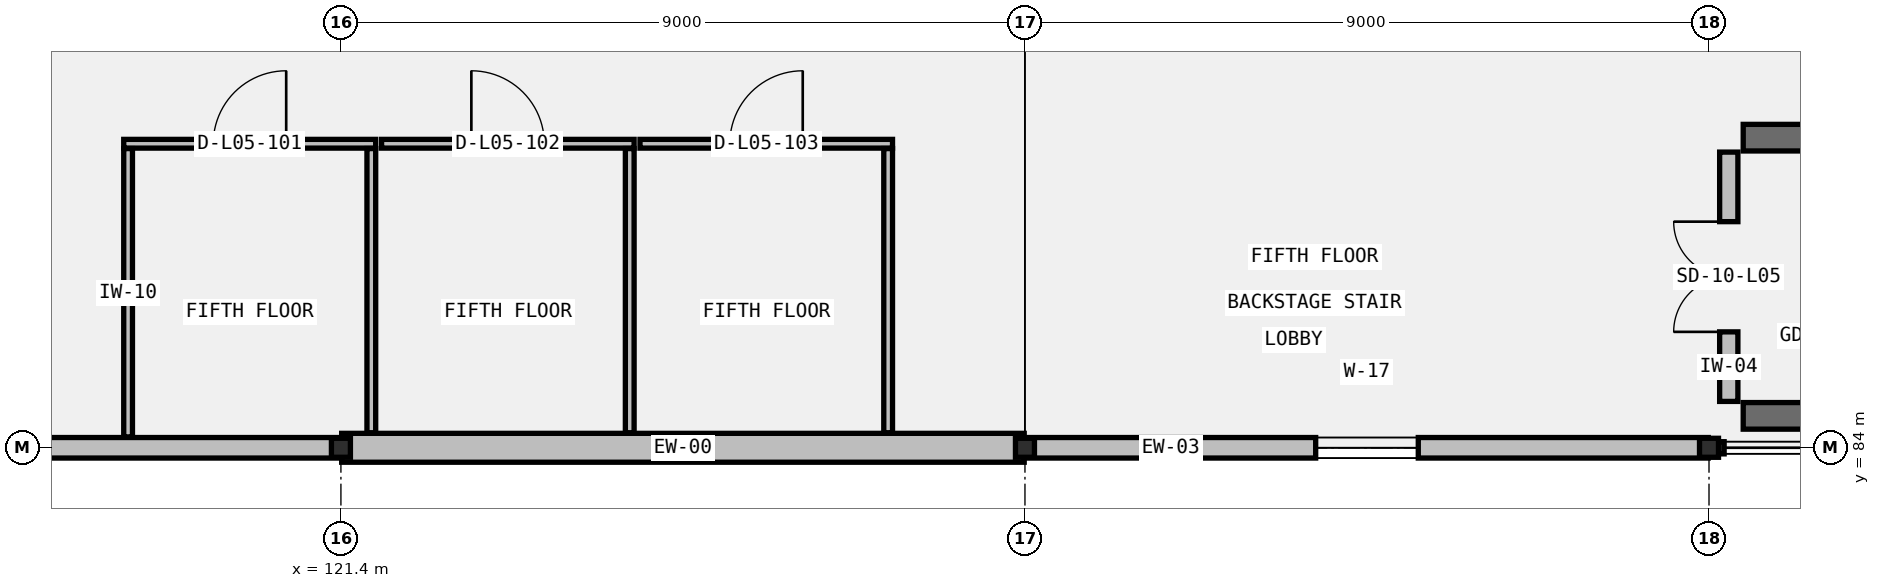
"""IFC4 building model, lengths in metres.
Left out: names, types, materials, properties, quantities, classifications, styles, units other than length and angle.
Written with IfcOpenShell. Run it as: python <this file> out.ifc"""

import sys

from ifc_helpers import new_model, si_unit, direction, frame, frame_2d, origin, origin_2d, place, context, subcontext, project, spatial, rectangle, i_section, extrude, element, fill, save


model = new_model("IFC4")
c1 = context("Model", 3, precision=1e-05, world=origin(), true_north=direction((0.0, 1.0)))
c2 = subcontext(c1, "Body", "Model", "MODEL_VIEW")
j1 = project(units=[si_unit("LENGTHUNIT", "METRE"), si_unit("PLANEANGLEUNIT", "RADIAN")], contexts=[c1])
p1 = place(None, origin())
s1 = spatial("IfcSite", under=j1, at=p1, CompositionType="ELEMENT")
p2 = place(p1, origin())
s2 = spatial("IfcBuilding", under=s1, at=p2, CompositionType="ELEMENT")
p3 = place(p2, frame((0.0, 0.0, 23.8)))
s3 = spatial("IfcBuildingStorey", under=s2, at=p3, CompositionType="ELEMENT", Elevation=23.8)
for number, where, z_axis, x_axis in (
    (1, (121.4, 84.0, 0.0), (0.0, 0.0, 1.0), (1.0, 0.0, 0.0)),
    (2, (130.4, 84.0, 0.0), (0.0, 0.0, 1.0), (1.0, 0.0, 0.0)),
    (3, (139.4, 84.0, 0.0), (0.0, 0.0, 1.0), (1.0, 0.0, 0.0)),
):
    element("IfcColumn", number, at=place(p3, frame(where, z_axis=z_axis, x_axis=x_axis)), inside=s3, PredefinedType="COLUMN", context=c2, shape_type="SweptSolid", body=[
        extrude(i_section(OverallWidth=0.25, OverallDepth=0.25, WebThickness=0.009, FlangeThickness=0.014, FilletRadius=0.016, at=origin_2d()), origin(), (0.0, 0.0, 1.0), 4.8),
    ])
for number, where, z_axis, x_axis in (
    (4, (139.85, 84.42, 0.0), (0.0, 0.0, 1.0), (1.0, 0.0, 0.0)),
    (5, (148.0, 88.08, 0.0), (0.0, 0.0, 1.0), (-1.0, 0.0, 0.0)),
):
    element("IfcWall", number, at=place(p3, frame(where, z_axis=z_axis, x_axis=x_axis)), inside=s3, PredefinedType="SHEAR", context=c2, shape_type="SweptSolid", body=[
        extrude(rectangle(XDim=8.15, YDim=0.35, at=frame_2d((4.075, 0.0))), origin(), (0.0, 0.0, 1.0), 4.56),
    ])
p4 = place(p3, frame((112.754, 84.0, 0.0), z_axis=(0.0, 0.0, 1.0), x_axis=(1.0, 0.0, 0.0)))
e6 = element("IfcWall", 6, at=p4, inside=s3, PredefinedType="STANDARD", context=c2, shape_type="SweptSolid", body=[
    extrude(rectangle(XDim=8.636, YDim=0.27, at=frame_2d((4.318, 0.0))), origin(), (0.0, 0.0, 1.0), 4.088),
])
p5 = place(p4, frame((3.843, 0.0, 0.95)))
e7 = element("IfcOpeningElement", 7, at=p5, cuts=e6, PredefinedType="OPENING", context=c2, shape_type="SweptSolid", body=[
    extrude(rectangle(XDim=0.95, YDim=1.55, at=frame_2d((0.475, 0.775))), frame((0.0, 0.145, 0.0), z_axis=(0.0, -1.0, 0.0), x_axis=(1.0, 0.0, 0.0)), (0.0, 0.0, 1.0), 0.29),
])
p6 = place(p3, frame((121.41, 84.0, 0.0), z_axis=(0.0, 0.0, 1.0), x_axis=(1.0, 0.0, 0.0)))
e8 = element("IfcWall", 8, at=p6, inside=s3, PredefinedType="STANDARD", context=c2, shape_type="SweptSolid", body=[
    extrude(rectangle(XDim=8.98, YDim=0.38, at=frame_2d((4.49, 0.0))), origin(), (0.0, 0.0, 1.0), 4.088),
])
p7 = place(p3, frame((130.41, 84.0, 0.0), z_axis=(0.0, 0.0, 1.0), x_axis=(1.0, 0.0, 0.0)))
e9 = element("IfcWall", 9, at=p7, inside=s3, PredefinedType="STANDARD", context=c2, shape_type="SweptSolid", body=[
    extrude(rectangle(XDim=8.98, YDim=0.27, at=frame_2d((4.49, 0.0))), origin(), (0.0, 0.0, 1.0), 4.088),
])
p8 = place(p7, frame((3.815, 0.0, 0.95)))
e10 = element("IfcOpeningElement", 10, at=p8, cuts=e9, PredefinedType="OPENING", context=c2, shape_type="SweptSolid", body=[
    extrude(rectangle(XDim=1.35, YDim=1.85, at=frame_2d((0.675, 0.925))), frame((0.0, 0.145, 0.0), z_axis=(0.0, -1.0, 0.0), x_axis=(1.0, 0.0, 0.0)), (0.0, 0.0, 1.0), 0.29),
])
p9 = place(p3, frame((139.66, 84.61, 0.0), z_axis=(0.0, 0.0, 1.0), x_axis=(0.0, 1.0, 0.0)))
e11 = element("IfcWall", 11, at=p9, inside=s3, PredefinedType="STANDARD", context=c2, shape_type="SweptSolid", body=[
    extrude(rectangle(XDim=3.28, YDim=0.24, at=frame_2d((1.64, 0.0))), origin(), (0.0, 0.0, 1.0), 4.56),
])
p10 = place(p9, frame((0.915, 0.0, 0.0)))
e12 = element("IfcOpeningElement", 12, at=p10, cuts=e11, PredefinedType="OPENING", context=c2, shape_type="SweptSolid", body=[
    extrude(rectangle(XDim=1.45, YDim=2.2, at=frame_2d((0.725, 1.1))), frame((0.0, 0.13, 0.0), z_axis=(0.0, -1.0, 0.0), x_axis=(1.0, 0.0, 0.0)), (0.0, 0.0, 1.0), 0.26),
])
p11 = place(p3, frame((118.542, 88.0, 0.0), z_axis=(0.0, 0.0, 1.0), x_axis=(1.0, 0.0, 0.0)))
e13 = element("IfcWall", 13, at=p11, inside=s3, PredefinedType="PARTITIONING", context=c2, shape_type="SweptSolid", body=[
    extrude(rectangle(XDim=3.315, YDim=0.115, at=frame_2d((1.657, 0.0))), origin(), (0.0, 0.0, 1.0), 4.234),
])
p12 = place(p11, frame((1.177, 0.0, 0.0)))
e14 = element("IfcOpeningElement", 14, at=p12, cuts=e13, PredefinedType="OPENING", context=c2, shape_type="SweptSolid", body=[
    extrude(rectangle(XDim=0.96, YDim=2.08, at=frame_2d((0.48, 1.04))), frame((0.0, 0.067, 0.0), z_axis=(0.0, -1.0, 0.0), x_axis=(1.0, 0.0, 0.0)), (0.0, 0.0, 1.0), 0.135),
])
p13 = place(p3, frame((121.8, 84.198, 0.0), z_axis=(0.0, 0.0, 1.0), x_axis=(0.0, 1.0, 0.0)))
e15 = element("IfcWall", 15, at=p13, inside=s3, PredefinedType="PARTITIONING", context=c2, shape_type="SweptSolid", body=[
    extrude(rectangle(XDim=3.739, YDim=0.115, at=frame_2d((1.869, 0.0))), origin(), (0.0, 0.0, 1.0), 4.088),
])
p14 = place(p3, frame((118.6, 84.143, 0.0), z_axis=(0.0, 0.0, 1.0), x_axis=(0.0, 1.0, 0.0)))
e16 = element("IfcWall", 16, at=p14, inside=s3, PredefinedType="PARTITIONING", context=c2, shape_type="SweptSolid", body=[
    extrude(rectangle(XDim=3.793, YDim=0.115, at=frame_2d((1.897, 0.0))), origin(), (0.0, 0.0, 1.0), 4.088),
])
p15 = place(p3, frame((121.935, 88.0, 0.0), z_axis=(0.0, 0.0, 1.0), x_axis=(1.0, 0.0, 0.0)))
e17 = element("IfcWall", 17, at=p15, inside=s3, PredefinedType="PARTITIONING", context=c2, shape_type="SweptSolid", body=[
    extrude(rectangle(XDim=3.323, YDim=0.115, at=frame_2d((1.661, 0.0))), origin(), (0.0, 0.0, 1.0), 4.328),
])
p16 = place(p15, frame((1.181, 0.0, 0.0)))
e18 = element("IfcOpeningElement", 18, at=p16, cuts=e17, PredefinedType="OPENING", context=c2, shape_type="SweptSolid", body=[
    extrude(rectangle(XDim=0.96, YDim=2.08, at=frame_2d((0.48, 1.04))), frame((0.0, 0.067, 0.0), z_axis=(0.0, -1.0, 0.0), x_axis=(1.0, 0.0, 0.0)), (0.0, 0.0, 1.0), 0.135),
])
p17 = place(p3, frame((125.2, 84.198, 0.0), z_axis=(0.0, 0.0, 1.0), x_axis=(0.0, 1.0, 0.0)))
e19 = element("IfcWall", 19, at=p17, inside=s3, PredefinedType="PARTITIONING", context=c2, shape_type="SweptSolid", body=[
    extrude(rectangle(XDim=3.739, YDim=0.115, at=frame_2d((1.869, 0.0))), origin(), (0.0, 0.0, 1.0), 4.088),
])
p18 = place(p3, frame((125.335, 88.0, 0.0), z_axis=(0.0, 0.0, 1.0), x_axis=(1.0, 0.0, 0.0)))
e20 = element("IfcWall", 20, at=p18, inside=s3, PredefinedType="PARTITIONING", context=c2, shape_type="SweptSolid", body=[
    extrude(rectangle(XDim=3.323, YDim=0.115, at=frame_2d((1.661, 0.0))), origin(), (0.0, 0.0, 1.0), 4.328),
])
p19 = place(p18, frame((1.181, 0.0, 0.0)))
e21 = element("IfcOpeningElement", 21, at=p19, cuts=e20, PredefinedType="OPENING", context=c2, shape_type="SweptSolid", body=[
    extrude(rectangle(XDim=0.96, YDim=2.08, at=frame_2d((0.48, 1.04))), frame((0.0, 0.067, 0.0), z_axis=(0.0, -1.0, 0.0), x_axis=(1.0, 0.0, 0.0)), (0.0, 0.0, 1.0), 0.135),
])
p20 = place(p3, frame((128.6, 84.198, 0.0), z_axis=(0.0, 0.0, 1.0), x_axis=(0.0, 1.0, 0.0)))
e22 = element("IfcWall", 22, at=p20, inside=s3, PredefinedType="PARTITIONING", context=c2, shape_type="SweptSolid", body=[
    extrude(rectangle(XDim=3.739, YDim=0.115, at=frame_2d((1.869, 0.0))), origin(), (0.0, 0.0, 1.0), 4.088),
])
p21 = place(p8, origin())
e23 = element("IfcWindow", 23, at=p21, inside=s3, PartitioningType="SINGLE_PANEL", PredefinedType="WINDOW", context=c2, shape_type="SweptSolid", body=[
    extrude(rectangle(XDim=1.35, YDim=1.85, at=frame_2d((0.675, 0.925))), frame((0.0, 0.03, 0.0), z_axis=(0.0, -1.0, 0.0), x_axis=(1.0, 0.0, 0.0)), (0.0, 0.0, 1.0), 0.06),
])
fill(e10, e23)
p22 = place(p10, origin())
e24 = element("IfcDoor", 24, at=p22, inside=s3, OperationType="DOUBLE_DOOR_SINGLE_SWING", PredefinedType="DOOR", context=c2, shape_type="SweptSolid", body=[
    extrude(rectangle(XDim=1.45, YDim=2.2, at=frame_2d((0.725, 1.1))), frame((0.0, 0.025, 0.0), z_axis=(0.0, -1.0, 0.0), x_axis=(1.0, 0.0, 0.0)), (0.0, 0.0, 1.0), 0.05),
])
fill(e12, e24)
p23 = place(p12, origin())
e25 = element("IfcDoor", 25, at=p23, inside=s3, OperationType="SINGLE_SWING_RIGHT", PredefinedType="DOOR", context=c2, shape_type="SweptSolid", body=[
    extrude(rectangle(XDim=0.96, YDim=2.08, at=frame_2d((0.48, 1.04))), frame((0.0, 0.025, 0.0), z_axis=(0.0, -1.0, 0.0), x_axis=(1.0, 0.0, 0.0)), (0.0, 0.0, 1.0), 0.05),
])
fill(e14, e25)
p24 = place(p16, origin())
e26 = element("IfcDoor", 26, at=p24, inside=s3, OperationType="SINGLE_SWING_LEFT", PredefinedType="DOOR", context=c2, shape_type="SweptSolid", body=[
    extrude(rectangle(XDim=0.96, YDim=2.08, at=frame_2d((0.48, 1.04))), frame((0.0, 0.025, 0.0), z_axis=(0.0, -1.0, 0.0), x_axis=(1.0, 0.0, 0.0)), (0.0, 0.0, 1.0), 0.05),
])
fill(e18, e26)
p25 = place(p19, origin())
e27 = element("IfcDoor", 27, at=p25, inside=s3, OperationType="SINGLE_SWING_RIGHT", PredefinedType="DOOR", context=c2, shape_type="SweptSolid", body=[
    extrude(rectangle(XDim=0.96, YDim=2.08, at=frame_2d((0.48, 1.04))), frame((0.0, 0.025, 0.0), z_axis=(0.0, -1.0, 0.0), x_axis=(1.0, 0.0, 0.0)), (0.0, 0.0, 1.0), 0.05),
])
fill(e21, e27)
save(model, sys.argv[1])
